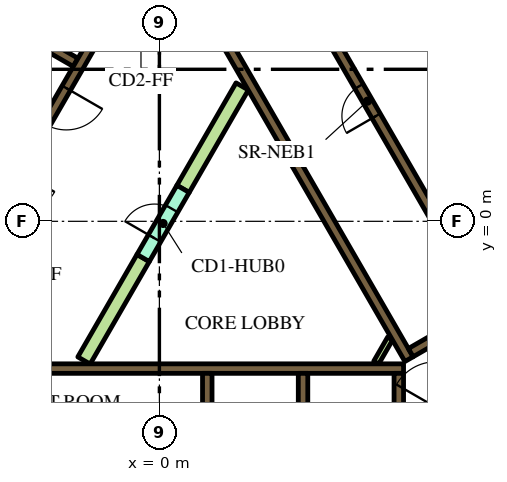
"""IFC4 building model, lengths in metres.
Left out: names, types, materials, properties, quantities, classifications, styles, units other than length and angle.
Written with IfcOpenShell. Run it as: python <this file> out.ifc"""

import sys

from ifc_helpers import new_model, si_unit, direction, frame, frame_2d, origin, place, context, subcontext, project, spatial, polyline, rectangle, outline, extrude, element, fill, save


model = new_model("IFC4")
c1 = context("Model", 3, precision=1e-05, world=origin(), true_north=direction((0.0, 1.0)))
c2 = subcontext(c1, "Body", "Model", "MODEL_VIEW")
j1 = project(units=[si_unit("LENGTHUNIT", "METRE"), si_unit("PLANEANGLEUNIT", "RADIAN")], contexts=[c1])
p1 = place(None, origin())
s1 = spatial("IfcSite", under=j1, at=p1, CompositionType="ELEMENT")
p2 = place(p1, origin())
s2 = spatial("IfcBuilding", under=s1, at=p2, CompositionType="ELEMENT")
p3 = place(p2, frame((0.0, 0.0, 35.4)))
s3 = spatial("IfcBuildingStorey", under=s2, at=p3, CompositionType="ELEMENT", Elevation=35.4)
p4 = place(p3, frame((6.711, 13.476, 0.0), z_axis=(0.0, 0.0, 1.0), x_axis=(0.500002723396, -0.866023831425, 0.0)))
e1 = element("IfcWall", 1, at=p4, inside=s3, PredefinedType="SOLIDWALL", context=c2, shape_type="SweptSolid", body=[
    extrude(rectangle(XDim=20.334, YDim=0.9, at=frame_2d((10.167, 0.0))), origin(), (0.0, 0.0, 1.0), 3.9),
])
p5 = place(p3, frame((-5.545, -3.875, 0.0), z_axis=(0.0, 0.0, 1.0), x_axis=(1.0, 0.0, 0.0)))
e2 = element("IfcWall", 2, at=p5, inside=s3, PredefinedType="SOLIDWALL", context=c2, shape_type="SweptSolid", body=[
    extrude(rectangle(XDim=11.97, YDim=0.25, at=frame_2d((5.985, 0.0))), origin(), (0.0, 0.0, 1.0), 3.9),
])
p6 = place(p3, frame((6.3, -7.268, 0.0), z_axis=(0.0, 0.0, 1.0), x_axis=(0.0, 1.0, 0.0)))
e3 = element("IfcWall", 3, at=p6, inside=s3, PredefinedType="SOLIDWALL", context=c2, shape_type="SweptSolid", body=[
    extrude(rectangle(XDim=3.268, YDim=0.25, at=frame_2d((1.634, 0.0))), origin(), (0.0, 0.0, 1.0), 3.9),
])
for number, where, z_axis, x_axis in (
    (4, (3.78, -4.0, 0.0), (0.0, 0.0, 1.0), (0.0, -1.0, 0.0)),
    (5, (1.26, -4.0, 0.0), (0.0, 0.0, 1.0), (0.0, -1.0, 0.0)),
):
    element("IfcWall", number, at=place(p3, frame(where, z_axis=z_axis, x_axis=x_axis)), inside=s3, PredefinedType="SOLIDWALL", context=c2, shape_type="SweptSolid", body=[
        extrude(rectangle(XDim=2.2, YDim=0.25, at=frame_2d((1.1, 0.0))), origin(), (0.0, 0.0, 1.0), 3.9),
    ])
p7 = place(p3, origin())
e6 = element("IfcWall", 6, at=p7, inside=s3, PredefinedType="SOLIDWALL", context=c2, shape_type="SweptSolid", body=[
    extrude(outline(polyline([(0.566, 6.725), (0.566, 6.875), (0.566, 6.875), (0.565, 6.875), (0.361, 6.875), (0.035, 7.439), (0.252, 7.564), (0.377, 7.348), (6.552, -3.348), (6.677, -3.564), (6.46, -3.689), (0.448, 6.725), (0.565, 6.725), (0.566, 6.725), (0.566, 6.725)])), origin(), (0.0, 0.0, 1.0), 3.9),
])
p8 = place(p3, frame((6.614, -3.456, 0.0), z_axis=(0.0, 0.0, 1.0), x_axis=(0.86602447079, 0.500001615989, 0.0)))
e7 = element("IfcWall", 7, at=p8, inside=s3, PredefinedType="SOLIDWALL", context=c2, shape_type="SweptSolid", body=[
    extrude(rectangle(XDim=3.154, YDim=0.25, at=frame_2d((1.577, 0.0))), origin(), (0.0, 0.0, 1.0), 3.9),
])
p9 = place(p3, frame((-8.06, -1.311, 0.0), z_axis=(0.0, 0.0, 1.0), x_axis=(0.50000273126, 0.866023826885, 0.0)))
e8 = element("IfcWall", 8, at=p9, inside=s3, PredefinedType="SOLIDWALL", context=c2, shape_type="SweptSolid", body=[
    extrude(rectangle(XDim=10.33, YDim=0.25, at=frame_2d((5.165, 0.0))), origin(), (0.0, 0.0, 1.0), 3.9),
])
p10 = place(p3, frame((-2.204, 4.182, 0.0), z_axis=(0.0, 0.0, 1.0), x_axis=(-0.866008176907, 0.50002983664, 0.0)))
e9 = element("IfcWall", 9, at=p10, inside=s3, PredefinedType="SOLIDWALL", context=c2, shape_type="SweptSolid", body=[
    extrude(rectangle(XDim=2.2, YDim=0.25, at=frame_2d((1.1, 0.0))), origin(), (0.0, 0.0, 1.0), 3.9),
])
p11 = place(p3, frame((5.705, -3.718, 0.0), z_axis=(0.0, 0.0, 1.0), x_axis=(0.499962090823, 0.866047289552, 0.0)))
e10 = element("IfcWall", 10, at=p11, inside=s3, PredefinedType="PARTITIONING", context=c2, shape_type="SweptSolid", body=[
    extrude(rectangle(XDim=0.735, YDim=0.15, at=frame_2d((0.367, 0.0))), origin(), (0.0, 0.0, 1.0), 2.75),
])
e11 = element("IfcWall", 11, at=p7, inside=s3, PredefinedType="PARTITIONING", context=c2, shape_type="SweptSolid", body=[
    extrude(outline(polyline([(-0.59, -0.872), (-0.265, -1.059), (-1.822, -3.756), (-2.147, -3.568), (-0.59, -0.872)])), origin(), (0.0, 0.0, 1.0), 2.75),
])
e12 = element("IfcWall", 12, at=p7, inside=s3, PredefinedType="PARTITIONING", context=c2, shape_type="SweptSolid", body=[
    extrude(outline(polyline([(2.017, 3.643), (2.342, 3.456), (0.785, 0.76), (0.46, 0.947), (2.017, 3.643)])), origin(), (0.0, 0.0, 1.0), 2.75),
])
p12 = place(p3, frame((11.553, -0.46, 0.0), z_axis=(0.0, 0.0, 1.0), x_axis=(-0.500006514828, 0.866021642414, 0.0)))
e13 = element("IfcWall", 13, at=p12, inside=s3, PredefinedType="SOLIDWALL", context=c2, shape_type="SweptSolid", body=[
    extrude(rectangle(XDim=12.35, YDim=0.25, at=frame_2d((6.175, 0.0))), origin(), (0.0, 0.0, 1.0), 3.9),
])
p13 = place(p12, frame((0.585, 0.0, 0.0)))
e14 = element("IfcOpeningElement", 14, at=p13, cuts=e13, PredefinedType="OPENING", context=c2, shape_type="SweptSolid", body=[
    extrude(rectangle(XDim=1.1, YDim=2.1, at=frame_2d((0.55, 1.05))), frame((0.0, 0.135, 0.0), z_axis=(0.0, -1.0, 0.0), x_axis=(1.0, 0.0, 0.0)), (0.0, 0.0, 1.0), 0.27),
])
p14 = place(p12, frame((3.105, 0.0, 0.0)))
e15 = element("IfcOpeningElement", 15, at=p14, cuts=e13, PredefinedType="OPENING", context=c2, shape_type="SweptSolid", body=[
    extrude(rectangle(XDim=1.1, YDim=2.1, at=frame_2d((0.55, 1.05))), frame((0.0, 0.135, 0.0), z_axis=(0.0, -1.0, 0.0), x_axis=(1.0, 0.0, 0.0)), (0.0, 0.0, 1.0), 0.27),
])
p15 = place(p12, frame((5.625, 0.0, 0.0)))
e16 = element("IfcOpeningElement", 16, at=p15, cuts=e13, PredefinedType="OPENING", context=c2, shape_type="SweptSolid", body=[
    extrude(rectangle(XDim=1.1, YDim=2.1, at=frame_2d((0.55, 1.05))), frame((0.0, 0.135, 0.0), z_axis=(0.0, -1.0, 0.0), x_axis=(1.0, 0.0, 0.0)), (0.0, 0.0, 1.0), 0.27),
])
p16 = place(p3, frame((8.565, -2.185, 0.0), z_axis=(0.0, 0.0, 1.0), x_axis=(-0.499997954832, 0.866026584559, 0.0)))
e17 = element("IfcWall", 17, at=p16, inside=s3, PredefinedType="SOLIDWALL", context=c2, shape_type="SweptSolid", body=[
    extrude(rectangle(XDim=12.35, YDim=0.25, at=frame_2d((6.175, 0.0))), origin(), (0.0, 0.0, 1.0), 3.9),
])
p17 = place(p16, frame((5.725, 0.0, 0.0)))
e18 = element("IfcOpeningElement", 18, at=p17, cuts=e17, PredefinedType="OPENING", context=c2, shape_type="SweptSolid", body=[
    extrude(rectangle(XDim=0.9, YDim=2.1, at=frame_2d((0.45, 1.05))), frame((0.0, 0.135, 0.0), z_axis=(0.0, -1.0, 0.0), x_axis=(1.0, 0.0, 0.0)), (0.0, 0.0, 1.0), 0.27),
])
p18 = place(p3, frame((-0.898, 6.194, 0.0), z_axis=(0.0, 0.0, 1.0), x_axis=(-0.499996202215, -0.866027596426, 0.0)))
e19 = element("IfcWall", 19, at=p18, inside=s3, PredefinedType="SOLIDWALL", context=c2, shape_type="SweptSolid", body=[
    extrude(rectangle(XDim=9.83, YDim=0.25, at=frame_2d((4.915, 0.0))), origin(), (0.0, 0.0, 1.0), 3.9),
])
p19 = place(p18, frame((0.585, 0.0, 0.0)))
e20 = element("IfcOpeningElement", 20, at=p19, cuts=e19, PredefinedType="OPENING", context=c2, shape_type="SweptSolid", body=[
    extrude(rectangle(XDim=1.1, YDim=2.1, at=frame_2d((0.55, 1.05))), frame((0.0, 0.135, 0.0), z_axis=(0.0, -1.0, 0.0), x_axis=(1.0, 0.0, 0.0)), (0.0, 0.0, 1.0), 0.27),
])
p20 = place(p18, frame((3.105, 0.0, 0.0)))
e21 = element("IfcOpeningElement", 21, at=p20, cuts=e19, PredefinedType="OPENING", context=c2, shape_type="SweptSolid", body=[
    extrude(rectangle(XDim=1.1, YDim=2.1, at=frame_2d((0.55, 1.05))), frame((0.0, 0.135, 0.0), z_axis=(0.0, -1.0, 0.0), x_axis=(1.0, 0.0, 0.0)), (0.0, 0.0, 1.0), 0.27),
])
p21 = place(p18, frame((5.625, 0.0, 0.0)))
e22 = element("IfcOpeningElement", 22, at=p21, cuts=e19, PredefinedType="OPENING", context=c2, shape_type="SweptSolid", body=[
    extrude(rectangle(XDim=1.1, YDim=2.1, at=frame_2d((0.55, 1.05))), frame((0.0, 0.135, 0.0), z_axis=(0.0, -1.0, 0.0), x_axis=(1.0, 0.0, 0.0)), (0.0, 0.0, 1.0), 0.27),
])
p22 = place(p18, frame((8.145, 0.0, 0.0)))
e23 = element("IfcOpeningElement", 23, at=p22, cuts=e19, PredefinedType="OPENING", context=c2, shape_type="SweptSolid", body=[
    extrude(rectangle(XDim=1.1, YDim=2.1, at=frame_2d((0.55, 1.05))), frame((0.0, 0.135, 0.0), z_axis=(0.0, -1.0, 0.0), x_axis=(1.0, 0.0, 0.0)), (0.0, 0.0, 1.0), 0.27),
])
p23 = place(p3, frame((7.053, -5.284, 0.0), z_axis=(0.0, 0.0, 1.0), x_axis=(0.500078061341, 0.865980330357, 0.0)))
e24 = element("IfcWall", 24, at=p23, inside=s3, PredefinedType="SOLIDWALL", context=c2, shape_type="SweptSolid", body=[
    extrude(rectangle(XDim=2.1, YDim=0.4, at=frame_2d((1.05, 0.0))), origin(), (0.0, 0.0, 1.0), 3.9),
])
p24 = place(p23, frame((0.45, 0.0, 0.0)))
e25 = element("IfcOpeningElement", 25, at=p24, cuts=e24, PredefinedType="OPENING", context=c2, shape_type="SweptSolid", body=[
    extrude(rectangle(XDim=1.2, YDim=2.1, at=frame_2d((0.6, 1.05))), frame((0.0, 0.21, 0.0), z_axis=(0.0, -1.0, 0.0), x_axis=(1.0, 0.0, 0.0)), (0.0, 0.0, 1.0), 0.42),
])
p25 = place(p3, frame((-0.427, -0.966, 0.0), z_axis=(0.0, 0.0, 1.0), x_axis=(0.49994051562, 0.866059744384, 0.0)))
e26 = element("IfcWall", 26, at=p25, inside=s3, PredefinedType="PARTITIONING", context=c2, shape_type="SweptSolid", body=[
    extrude(rectangle(XDim=2.1, YDim=0.375, at=frame_2d((1.05, 0.0))), origin(), (0.0, 0.0, 1.0), 2.75),
])
p26 = place(p25, frame((0.6, 0.0, 0.0)))
e27 = element("IfcOpeningElement", 27, at=p26, cuts=e26, PredefinedType="OPENING", context=c2, shape_type="SweptSolid", body=[
    extrude(rectangle(XDim=0.9, YDim=2.1, at=frame_2d((0.45, 1.05))), frame((0.0, 0.198, 0.0), z_axis=(0.0, -1.0, 0.0), x_axis=(1.0, 0.0, 0.0)), (0.0, 0.0, 1.0), 0.395),
])
p27 = place(p3, frame((6.163, 18.475, 0.0), z_axis=(0.0, 0.0, 1.0), x_axis=(0.500001317485, -0.866024643133, 0.0)))
e28 = element("IfcWall", 28, at=p27, inside=s3, PredefinedType="PARTITIONING", context=c2, shape_type="SweptSolid", body=[
    extrude(rectangle(XDim=25.767, YDim=0.15, at=frame_2d((12.883, 0.0))), origin(), (0.0, 0.0, 1.0), 2.75),
])
p28 = place(p27, frame((24.586, 0.0, 0.0)))
e29 = element("IfcOpeningElement", 29, at=p28, cuts=e28, PredefinedType="OPENING", context=c2, shape_type="SweptSolid", body=[
    extrude(rectangle(XDim=1.0, YDim=2.1, at=frame_2d((0.5, 1.05))), frame((0.0, 0.085, 0.0), z_axis=(0.0, -1.0, 0.0), x_axis=(1.0, 0.0, 0.0)), (0.0, 0.0, 1.0), 0.17),
])
p29 = place(p27, frame((19.319, 0.0, 0.0)))
e30 = element("IfcOpeningElement", 30, at=p29, cuts=e28, PredefinedType="OPENING", context=c2, shape_type="SweptSolid", body=[
    extrude(rectangle(XDim=1.0, YDim=2.1, at=frame_2d((0.5, 1.05))), frame((0.0, 0.085, 0.0), z_axis=(0.0, -1.0, 0.0), x_axis=(1.0, 0.0, 0.0)), (0.0, 0.0, 1.0), 0.17),
])
p30 = place(p27, frame((18.012, 0.0, 0.0)))
e31 = element("IfcOpeningElement", 31, at=p30, cuts=e28, PredefinedType="OPENING", context=c2, shape_type="SweptSolid", body=[
    extrude(rectangle(XDim=1.0, YDim=2.1, at=frame_2d((0.5, 1.05))), frame((0.0, 0.085, 0.0), z_axis=(0.0, -1.0, 0.0), x_axis=(1.0, 0.0, 0.0)), (0.0, 0.0, 1.0), 0.17),
])
p31 = place(p27, frame((6.824, 0.0, 0.0)))
e32 = element("IfcOpeningElement", 32, at=p31, cuts=e28, PredefinedType="OPENING", context=c2, shape_type="SweptSolid", body=[
    extrude(rectangle(XDim=1.1, YDim=2.1, at=frame_2d((0.55, 1.05))), frame((0.0, 0.085, 0.0), z_axis=(0.0, -1.0, 0.0), x_axis=(1.0, 0.0, 0.0)), (0.0, 0.0, 1.0), 0.17),
])
p32 = place(p27, frame((4.658, 0.0, 0.0)))
e33 = element("IfcOpeningElement", 33, at=p32, cuts=e28, PredefinedType="OPENING", context=c2, shape_type="SweptSolid", body=[
    extrude(rectangle(XDim=0.9, YDim=2.1, at=frame_2d((0.45, 1.05))), frame((0.0, 0.085, 0.0), z_axis=(0.0, -1.0, 0.0), x_axis=(1.0, 0.0, 0.0)), (0.0, 0.0, 1.0), 0.17),
])
p33 = place(p27, frame((0.18, 0.0, 0.0)))
e34 = element("IfcOpeningElement", 34, at=p33, cuts=e28, PredefinedType="OPENING", context=c2, shape_type="SweptSolid", body=[
    extrude(rectangle(XDim=1.0, YDim=2.1, at=frame_2d((0.5, 1.05))), frame((0.0, 0.085, 0.0), z_axis=(0.0, -1.0, 0.0), x_axis=(1.0, 0.0, 0.0)), (0.0, 0.0, 1.0), 0.17),
])
p34 = place(p17, origin())
e35 = element("IfcDoor", 35, at=p34, inside=s3, OperationType="SINGLE_SWING_LEFT", PredefinedType="DOOR", context=c2, shape_type="SweptSolid", body=[
    extrude(rectangle(XDim=0.9, YDim=2.1, at=frame_2d((0.45, 1.05))), frame((0.0, 0.025, 0.0), z_axis=(0.0, -1.0, 0.0), x_axis=(1.0, 0.0, 0.0)), (0.0, 0.0, 1.0), 0.05),
])
fill(e18, e35)
p35 = place(p20, origin())
e36 = element("IfcDoor", 36, at=p35, inside=s3, OperationType="DOUBLE_DOOR_SLIDING", PredefinedType="DOOR", context=c2, shape_type="SweptSolid", body=[
    extrude(rectangle(XDim=1.1, YDim=2.1, at=frame_2d((0.55, 1.05))), frame((0.0, 0.025, 0.0), z_axis=(0.0, -1.0, 0.0), x_axis=(1.0, 0.0, 0.0)), (0.0, 0.0, 1.0), 0.05),
])
fill(e21, e36)
p36 = place(p26, origin())
e37 = element("IfcDoor", 37, at=p36, inside=s3, OperationType="SINGLE_SWING_LEFT", PredefinedType="DOOR", context=c2, shape_type="SweptSolid", body=[
    extrude(rectangle(XDim=0.9, YDim=2.1, at=frame_2d((0.45, 1.05))), frame((0.0, 0.025, 0.0), z_axis=(0.0, -1.0, 0.0), x_axis=(1.0, 0.0, 0.0)), (0.0, 0.0, 1.0), 0.05),
])
fill(e27, e37)
save(model, sys.argv[1])
